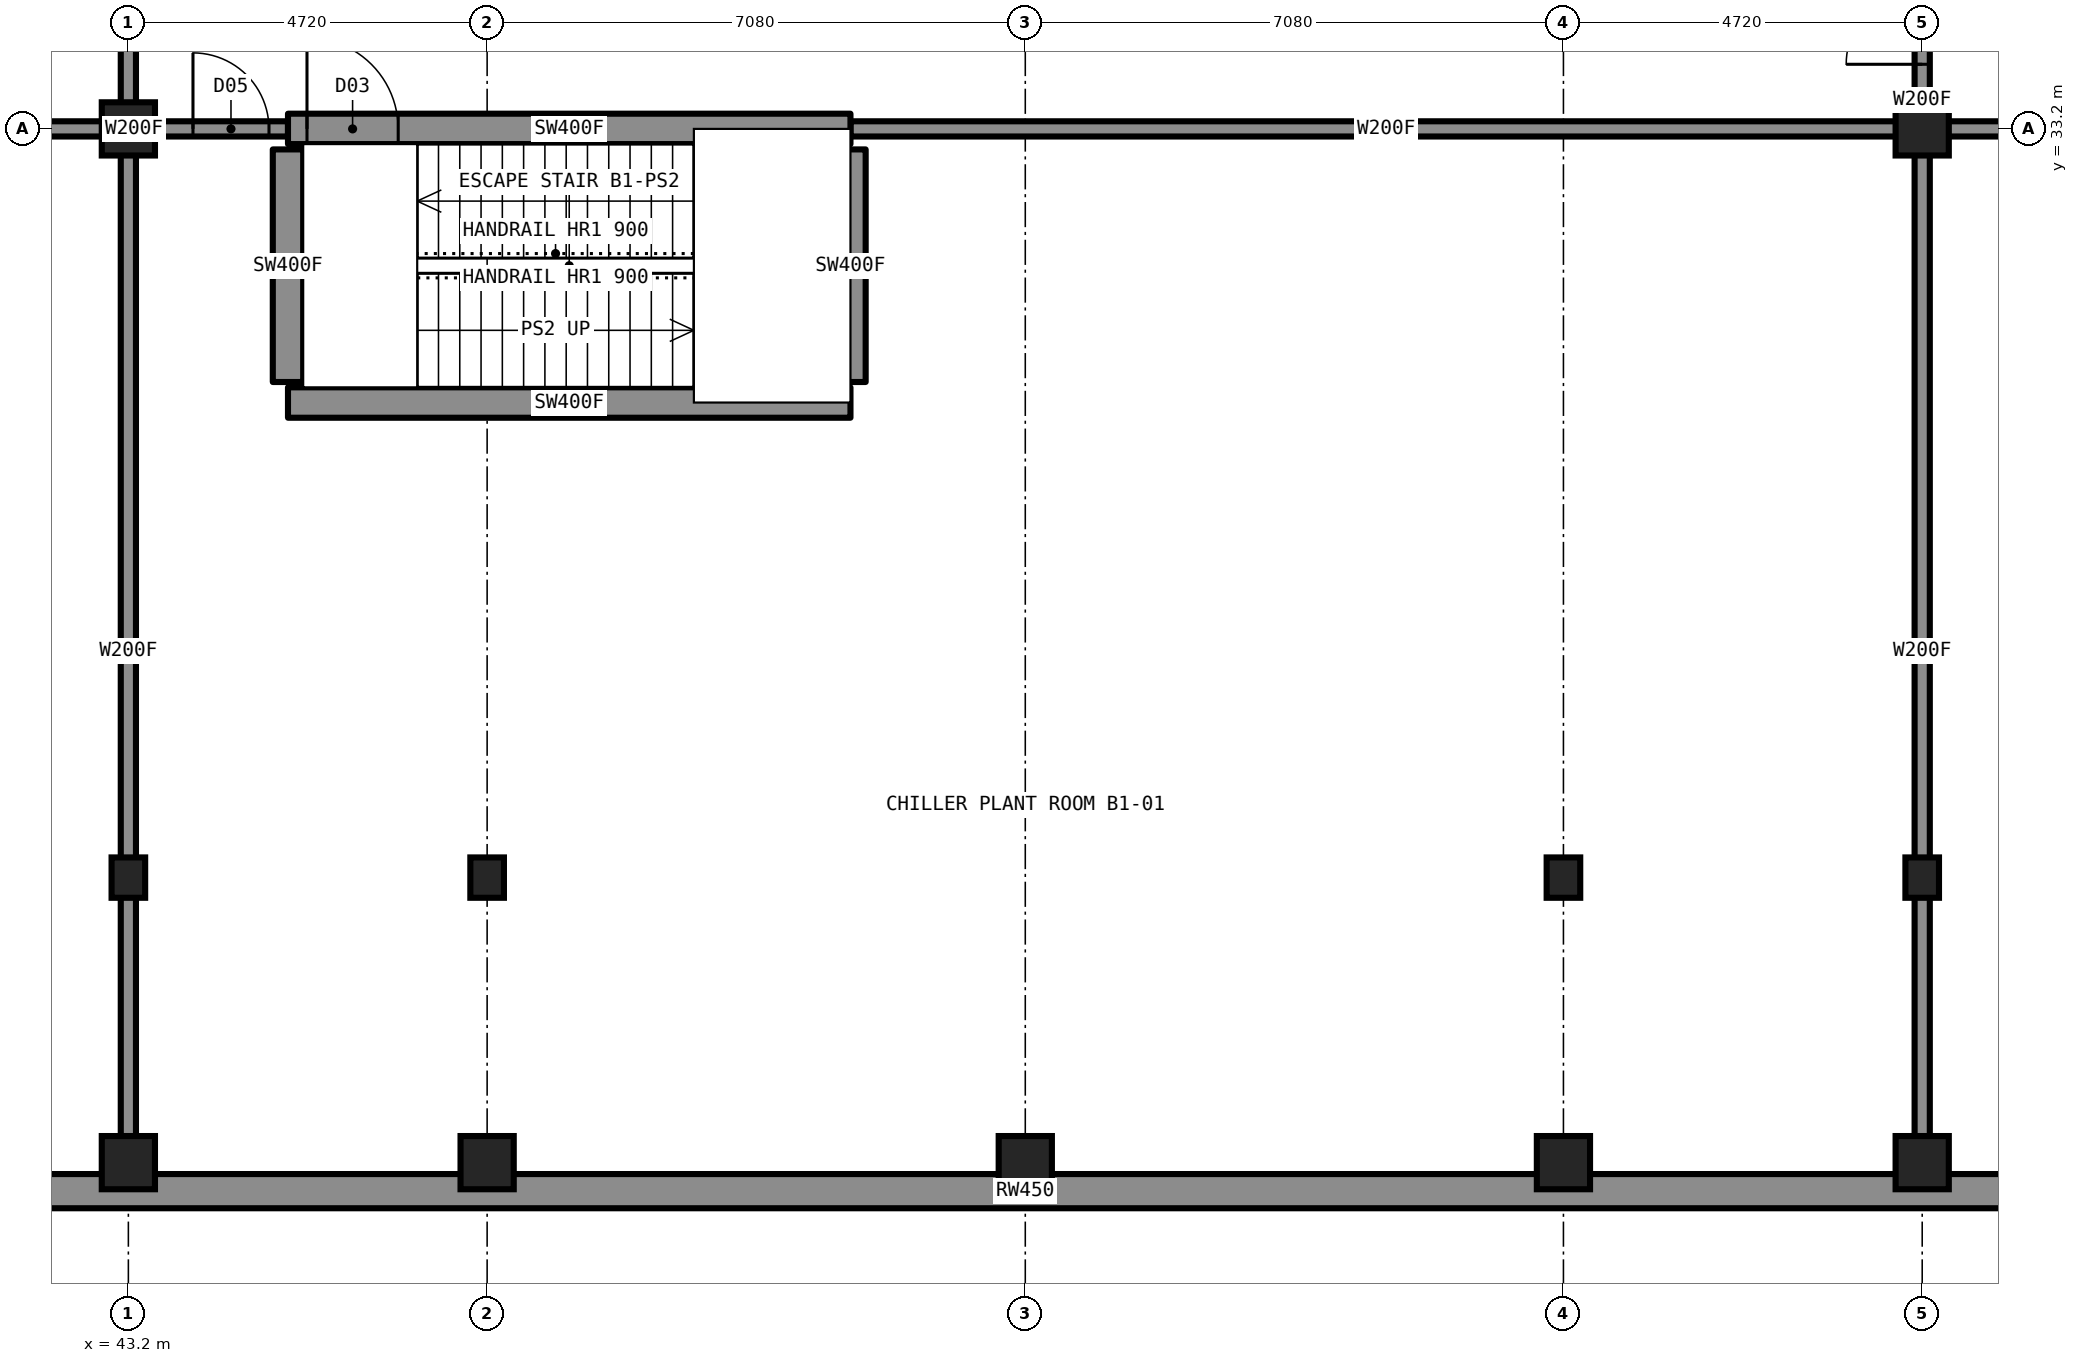
"""IFC4 building model, lengths in metres.
Left out: names, types, materials, properties, quantities, classifications, styles, units other than length and angle.
Written with IfcOpenShell. Run it as: python <this file> out.ifc"""

import sys

from ifc_helpers import new_model, si_unit, direction, frame, frame_2d, origin, origin_2d, place, context, subcontext, project, spatial, rectangle, hollow_rectangle, i_section, extrude, element, fill, save


model = new_model("IFC4")
c1 = context("Model", 3, precision=1e-05, world=origin(), true_north=direction((0.0, 1.0)))
c2 = subcontext(c1, "Body", "Model", "MODEL_VIEW")
j1 = project(units=[si_unit("LENGTHUNIT", "METRE"), si_unit("PLANEANGLEUNIT", "RADIAN")], contexts=[c1])
p1 = place(None, origin())
s1 = spatial("IfcSite", under=j1, at=p1, CompositionType="ELEMENT")
p2 = place(p1, origin())
s2 = spatial("IfcBuilding", under=s1, at=p2, CompositionType="ELEMENT")
p3 = place(p2, frame((0.0, 0.0, -5.0)))
s3 = spatial("IfcBuildingStorey", under=s2, at=p3, CompositionType="ELEMENT", Elevation=-5.0)
for number, where, z_axis, x_axis in (
    (1, (43.2, 23.35, 0.0), (0.0, 0.0, 1.0), (1.0, 0.0, 0.0)),
    (2, (47.92, 23.35, 0.0), (0.0, 0.0, 1.0), (1.0, 0.0, 0.0)),
    (3, (62.08, 23.35, 0.0), (0.0, 0.0, 1.0), (1.0, 0.0, 0.0)),
    (4, (66.8, 23.35, 0.0), (0.0, 0.0, 1.0), (1.0, 0.0, 0.0)),
):
    element("IfcColumn", number, at=place(p3, frame(where, z_axis=z_axis, x_axis=x_axis)), inside=s3, PredefinedType="COLUMN", context=c2, shape_type="SweptSolid", body=[
        extrude(i_section(OverallWidth=0.442, OverallDepth=0.531, WebThickness=0.066, FlangeThickness=0.106, at=origin_2d()), origin(), (0.0, 0.0, 1.0), 5.0),
    ])
for number, where, z_axis, x_axis in (
    (5, (43.2, 33.2, 0.0), (0.0, 0.0, 1.0), (1.0, 0.0, 0.0)),
    (6, (66.8, 33.2, 0.0), (0.0, 0.0, 1.0), (1.0, 0.0, 0.0)),
):
    element("IfcColumn", number, at=place(p3, frame(where, z_axis=z_axis, x_axis=x_axis)), inside=s3, PredefinedType="COLUMN", context=c2, shape_type="SweptSolid", body=[
        extrude(hollow_rectangle(XDim=0.7, YDim=0.7, WallThickness=0.06, at=origin_2d()), origin(), (0.0, 0.0, 1.0), 5.0),
    ])
for number, where, z_axis, x_axis in (
    (7, (43.2, 19.6, 0.0), (0.0, 0.0, 1.0), (1.0, 0.0, 0.0)),
    (8, (47.92, 19.6, 0.0), (0.0, 0.0, 1.0), (1.0, 0.0, 0.0)),
    (9, (55.0, 19.6, 0.0), (0.0, 0.0, 1.0), (1.0, 0.0, 0.0)),
    (10, (62.08, 19.6, 0.0), (0.0, 0.0, 1.0), (1.0, 0.0, 0.0)),
    (11, (66.8, 19.6, 0.0), (0.0, 0.0, 1.0), (1.0, 0.0, 0.0)),
):
    element("IfcColumn", number, at=place(p3, frame(where, z_axis=z_axis, x_axis=x_axis)), inside=s3, PredefinedType="COLUMN", context=c2, shape_type="SweptSolid", body=[
        extrude(rectangle(XDim=0.7, YDim=0.7, at=origin_2d()), origin(), (0.0, 0.0, 1.0), 5.0),
    ])
p4 = place(p3, frame((23.0, 19.225, 0.0), z_axis=(0.0, 0.0, 1.0), x_axis=(1.0, 0.0, 0.0)))
e12 = element("IfcWall", 12, at=p4, inside=s3, PredefinedType="SOLIDWALL", context=c2, shape_type="SweptSolid", body=[
    extrude(rectangle(XDim=64.0, YDim=0.45, at=frame_2d((32.0, 0.0))), origin(), (0.0, 0.0, 1.0), 5.0),
])
p5 = place(p3, frame((43.2, 33.2, 0.0), z_axis=(0.0, 0.0, 1.0), x_axis=(1.0, 0.0, 0.0)))
e13 = element("IfcWall", 13, at=p5, inside=s3, PredefinedType="PARTITIONING", context=c2, shape_type="SweptSolid", body=[
    extrude(rectangle(XDim=2.1, YDim=0.2, at=frame_2d((1.05, 0.0))), origin(), (0.0, 0.0, 1.0), 4.6),
])
p6 = place(p5, frame((0.85, 0.0, 0.0)))
e14 = element("IfcOpeningElement", 14, at=p6, cuts=e13, PredefinedType="OPENING", context=c2, shape_type="SweptSolid", body=[
    extrude(rectangle(XDim=1.0, YDim=2.1, at=frame_2d((0.5, 1.05))), frame((0.0, 0.11, 0.0), z_axis=(0.0, -1.0, 0.0), x_axis=(1.0, 0.0, 0.0)), (0.0, 0.0, 1.0), 0.22),
])
p7 = place(p3, frame((52.7, 33.2, 0.0), z_axis=(0.0, 0.0, 1.0), x_axis=(1.0, 0.0, 0.0)))
e15 = element("IfcWall", 15, at=p7, inside=s3, PredefinedType="PARTITIONING", context=c2, shape_type="SweptSolid", body=[
    extrude(rectangle(XDim=14.1, YDim=0.2, at=frame_2d((7.05, 0.0))), origin(), (0.0, 0.0, 1.0), 4.6),
])
p8 = place(p3, frame((23.45, 33.2, 0.0), z_axis=(0.0, 0.0, 1.0), x_axis=(1.0, 0.0, 0.0)))
e16 = element("IfcWall", 16, at=p8, inside=s3, PredefinedType="PARTITIONING", context=c2, shape_type="SweptSolid", body=[
    extrude(rectangle(XDim=19.75, YDim=0.2, at=frame_2d((9.875, 0.0))), origin(), (0.0, 0.0, 1.0), 4.6),
])
p9 = place(p8, frame((11.05, 0.0, 0.0)))
e17 = element("IfcOpeningElement", 17, at=p9, cuts=e16, PredefinedType="OPENING", context=c2, shape_type="SweptSolid", body=[
    extrude(rectangle(XDim=1.0, YDim=2.1, at=frame_2d((0.5, 1.05))), frame((0.0, 0.11, 0.0), z_axis=(0.0, -1.0, 0.0), x_axis=(1.0, 0.0, 0.0)), (0.0, 0.0, 1.0), 0.22),
])
p10 = place(p3, frame((66.8, 33.2, 0.0), z_axis=(0.0, 0.0, 1.0), x_axis=(1.0, 0.0, 0.0)))
e18 = element("IfcWall", 18, at=p10, inside=s3, PredefinedType="PARTITIONING", context=c2, shape_type="SweptSolid", body=[
    extrude(rectangle(XDim=19.75, YDim=0.2, at=frame_2d((9.875, 0.0))), origin(), (0.0, 0.0, 1.0), 4.6),
])
p11 = place(p10, frame((7.7, 0.0, 0.0)))
e19 = element("IfcOpeningElement", 19, at=p11, cuts=e18, PredefinedType="OPENING", context=c2, shape_type="SweptSolid", body=[
    extrude(rectangle(XDim=1.0, YDim=2.1, at=frame_2d((0.5, 1.05))), frame((0.0, 0.11, 0.0), z_axis=(0.0, -1.0, 0.0), x_axis=(1.0, 0.0, 0.0)), (0.0, 0.0, 1.0), 0.22),
])
p12 = place(p3, frame((45.3, 33.2, 0.0), z_axis=(0.0, 0.0, 1.0), x_axis=(1.0, 0.0, 0.0)))
e20 = element("IfcWall", 20, at=p12, inside=s3, PredefinedType="SHEAR", context=c2, shape_type="SweptSolid", body=[
    extrude(rectangle(XDim=7.4, YDim=0.4, at=frame_2d((3.7, 0.0))), origin(), (0.0, 0.0, 1.0), 5.0),
])
p13 = place(p12, frame((0.25, 0.0, 0.0)))
e21 = element("IfcOpeningElement", 21, at=p13, cuts=e20, PredefinedType="OPENING", context=c2, shape_type="SweptSolid", body=[
    extrude(rectangle(XDim=1.2, YDim=2.2, at=frame_2d((0.6, 1.1))), frame((0.0, 0.21, 0.0), z_axis=(0.0, -1.0, 0.0), x_axis=(1.0, 0.0, 0.0)), (0.0, 0.0, 1.0), 0.42),
])
p14 = place(p3, frame((45.3, 29.6, 0.0), z_axis=(0.0, 0.0, 1.0), x_axis=(1.0, 0.0, 0.0)))
e22 = element("IfcWall", 22, at=p14, inside=s3, PredefinedType="SHEAR", context=c2, shape_type="SweptSolid", body=[
    extrude(rectangle(XDim=7.4, YDim=0.4, at=frame_2d((3.7, 0.0))), origin(), (0.0, 0.0, 1.0), 5.0),
])
p15 = place(p3, frame((43.2, 33.2, 0.0), z_axis=(0.0, 0.0, 1.0), x_axis=(0.0, 1.0, 0.0)))
e23 = element("IfcWall", 23, at=p15, inside=s3, PredefinedType="PARTITIONING", context=c2, shape_type="SweptSolid", body=[
    extrude(rectangle(XDim=14.1, YDim=0.2, at=frame_2d((7.05, 0.0))), origin(), (0.0, 0.0, 1.0), 4.6),
])
p16 = place(p15, frame((3.3, 0.0, 0.0)))
e24 = element("IfcOpeningElement", 24, at=p16, cuts=e23, PredefinedType="OPENING", context=c2, shape_type="SweptSolid", body=[
    extrude(rectangle(XDim=1.0, YDim=2.1, at=frame_2d((0.5, 1.05))), frame((0.0, 0.11, 0.0), z_axis=(0.0, -1.0, 0.0), x_axis=(1.0, 0.0, 0.0)), (0.0, 0.0, 1.0), 0.22),
])
p17 = place(p15, frame((12.85, 0.0, 0.0)))
e25 = element("IfcOpeningElement", 25, at=p17, cuts=e23, PredefinedType="OPENING", context=c2, shape_type="SweptSolid", body=[
    extrude(rectangle(XDim=1.0, YDim=2.1, at=frame_2d((0.5, 1.05))), frame((0.0, 0.11, 0.0), z_axis=(0.0, -1.0, 0.0), x_axis=(1.0, 0.0, 0.0)), (0.0, 0.0, 1.0), 0.22),
])
p18 = place(p3, frame((43.2, 19.45, 0.0), z_axis=(0.0, 0.0, 1.0), x_axis=(0.0, 1.0, 0.0)))
e26 = element("IfcWall", 26, at=p18, inside=s3, PredefinedType="PARTITIONING", context=c2, shape_type="SweptSolid", body=[
    extrude(rectangle(XDim=13.75, YDim=0.2, at=frame_2d((6.875, 0.0))), origin(), (0.0, 0.0, 1.0), 4.6),
])
for number, where, z_axis, x_axis in (
    (27, (52.7, 29.87, 0.0), (0.0, 0.0, 1.0), (0.0, 1.0, 0.0)),
    (28, (45.3, 29.87, 0.0), (0.0, 0.0, 1.0), (0.0, 1.0, 0.0)),
):
    element("IfcWall", number, at=place(p3, frame(where, z_axis=z_axis, x_axis=x_axis)), inside=s3, PredefinedType="SHEAR", context=c2, shape_type="SweptSolid", body=[
        extrude(rectangle(XDim=3.06, YDim=0.4, at=frame_2d((1.53, 0.0))), origin(), (0.0, 0.0, 1.0), 5.0),
    ])
p19 = place(p3, frame((66.8, 33.2, 0.0), z_axis=(0.0, 0.0, 1.0), x_axis=(0.0, 1.0, 0.0)))
e29 = element("IfcWall", 29, at=p19, inside=s3, PredefinedType="PARTITIONING", context=c2, shape_type="SweptSolid", body=[
    extrude(rectangle(XDim=2.1, YDim=0.2, at=frame_2d((1.05, 0.0))), origin(), (0.0, 0.0, 1.0), 4.6),
])
p20 = place(p19, frame((0.85, 0.0, 0.0)))
e30 = element("IfcOpeningElement", 30, at=p20, cuts=e29, PredefinedType="OPENING", context=c2, shape_type="SweptSolid", body=[
    extrude(rectangle(XDim=1.0, YDim=2.1, at=frame_2d((0.5, 1.05))), frame((0.0, 0.11, 0.0), z_axis=(0.0, -1.0, 0.0), x_axis=(1.0, 0.0, 0.0)), (0.0, 0.0, 1.0), 0.22),
])
p21 = place(p3, frame((66.8, 19.45, 0.0), z_axis=(0.0, 0.0, 1.0), x_axis=(0.0, 1.0, 0.0)))
e31 = element("IfcWall", 31, at=p21, inside=s3, PredefinedType="PARTITIONING", context=c2, shape_type="SweptSolid", body=[
    extrude(rectangle(XDim=13.75, YDim=0.2, at=frame_2d((6.875, 0.0))), origin(), (0.0, 0.0, 1.0), 4.6),
])
p22 = place(p13, origin())
e32 = element("IfcDoor", 32, at=p22, inside=s3, OperationType="SINGLE_SWING_LEFT", PredefinedType="DOOR", context=c2, shape_type="SweptSolid", body=[
    extrude(rectangle(XDim=1.2, YDim=2.2, at=frame_2d((0.6, 1.1))), frame((0.0, 0.025, 0.0), z_axis=(0.0, -1.0, 0.0), x_axis=(1.0, 0.0, 0.0)), (0.0, 0.0, 1.0), 0.05),
])
fill(e21, e32)
p23 = place(p6, origin())
e33 = element("IfcDoor", 33, at=p23, inside=s3, OperationType="SINGLE_SWING_LEFT", PredefinedType="DOOR", context=c2, shape_type="SweptSolid", body=[
    extrude(rectangle(XDim=1.0, YDim=2.1, at=frame_2d((0.5, 1.05))), frame((0.0, 0.025, 0.0), z_axis=(0.0, -1.0, 0.0), x_axis=(1.0, 0.0, 0.0)), (0.0, 0.0, 1.0), 0.05),
])
fill(e14, e33)
p24 = place(p20, origin())
e34 = element("IfcDoor", 34, at=p24, inside=s3, OperationType="SINGLE_SWING_LEFT", PredefinedType="DOOR", context=c2, shape_type="SweptSolid", body=[
    extrude(rectangle(XDim=1.0, YDim=2.1, at=frame_2d((0.5, 1.05))), frame((0.0, 0.025, 0.0), z_axis=(0.0, -1.0, 0.0), x_axis=(1.0, 0.0, 0.0)), (0.0, 0.0, 1.0), 0.05),
])
fill(e30, e34)
save(model, sys.argv[1])
